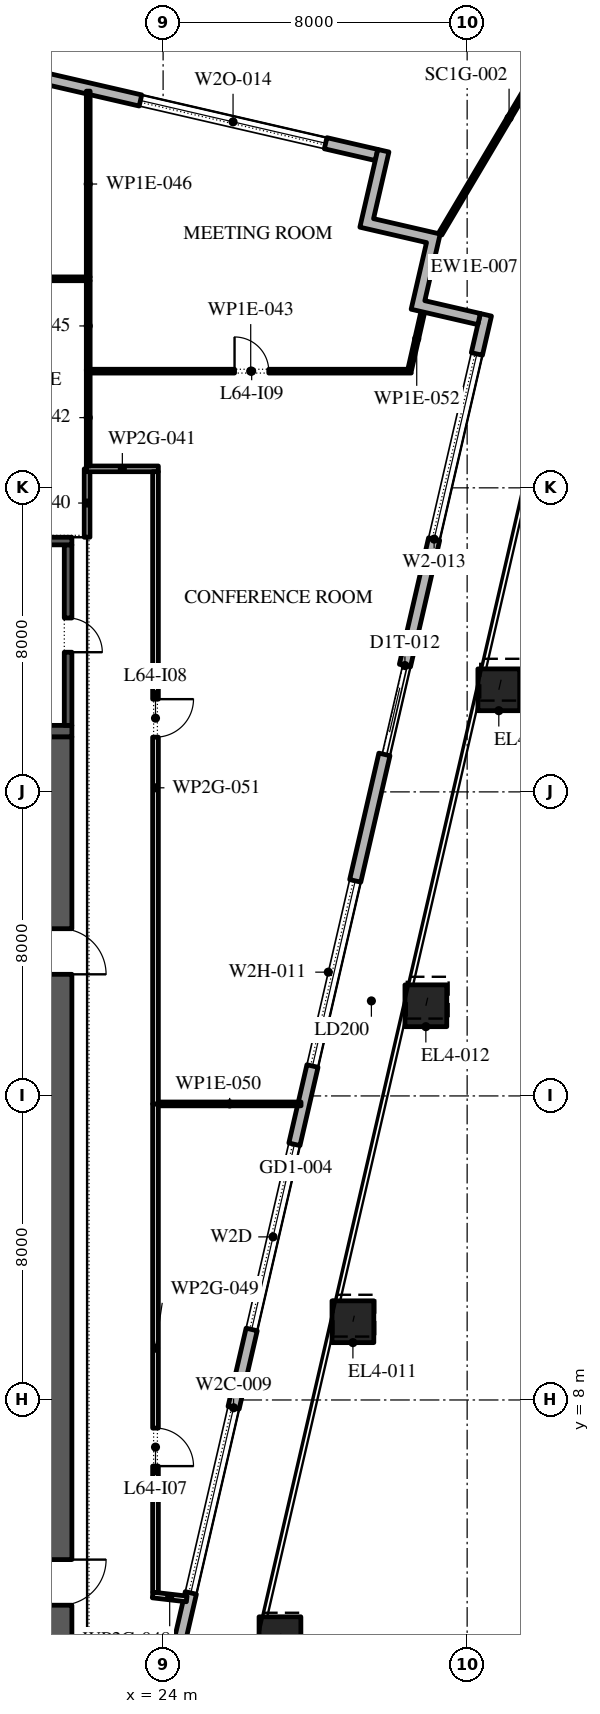
"""IFC4 building model, lengths in metres.
Left out: names, types, materials, properties, quantities, classifications, styles, units other than length and angle.
Written with IfcOpenShell. Run it as: python <this file> out.ifc"""

import sys

from ifc_helpers import new_model, si_unit, direction, frame, frame_2d, origin, origin_2d, place, context, subcontext, project, spatial, polyline, rectangle, outline, extrude, element, fill, save


model = new_model("IFC4")
c1 = context("Model", 3, precision=1e-05, world=origin(), true_north=direction((0.0, 1.0)))
c2 = subcontext(c1, "Body", "Model", "MODEL_VIEW")
j1 = project(units=[si_unit("LENGTHUNIT", "METRE"), si_unit("PLANEANGLEUNIT", "RADIAN")], contexts=[c1])
p1 = place(None, origin())
s1 = spatial("IfcSite", under=j1, at=p1, CompositionType="ELEMENT")
p2 = place(p1, origin())
s2 = spatial("IfcBuilding", under=s1, at=p2, CompositionType="ELEMENT")
p3 = place(p2, frame((0.0, 0.0, 293.4)))
s3 = spatial("IfcBuildingStorey", under=s2, at=p3, CompositionType="ELEMENT", Elevation=293.4)
p4 = place(p3, frame((27.075, 1.745, 0.0), z_axis=(0.005810646452, 0.025276312067, 0.999663615641), x_axis=(-0.974579651079, 0.224041299099, 0.0)))
e1 = element("IfcColumn", 1, at=p4, inside=s3, PredefinedType="COLUMN", context=c2, shape_type="SweptSolid", body=[
    extrude(rectangle(XDim=1.1, YDim=1.1, at=origin_2d()), origin(), (0.0, 0.0, 1.0), 4.202),
])
p5 = place(p3, frame((28.994, 10.059, 0.0), z_axis=(0.008712298116, 0.0379275378, 0.999242511975), x_axis=(-0.974617095667, 0.223878352757, 0.0)))
e2 = element("IfcColumn", 2, at=p5, inside=s3, PredefinedType="COLUMN", context=c2, shape_type="SweptSolid", body=[
    extrude(rectangle(XDim=1.1, YDim=1.1, at=origin_2d()), origin(), (0.0, 0.0, 1.0), 4.203),
])
p6 = place(p3, frame((30.914, 18.373, 0.0), z_axis=(0.011667590749, 0.050559559912, 0.998652891764), x_axis=(-0.974391195695, 0.224859506699, 0.0)))
e3 = element("IfcColumn", 3, at=p6, inside=s3, PredefinedType="COLUMN", context=c2, shape_type="SweptSolid", body=[
    extrude(rectangle(XDim=1.1, YDim=1.1, at=origin_2d()), origin(), (0.0, 0.0, 1.0), 4.206),
])
p7 = place(p3, frame((32.833, 26.686, 0.0), z_axis=(0.014558945825, 0.063166103598, 0.997896828561), x_axis=(-0.97445148511, 0.224598092528, 0.0)))
e4 = element("IfcColumn", 4, at=p7, inside=s3, PredefinedType="COLUMN", context=c2, shape_type="SweptSolid", body=[
    extrude(rectangle(XDim=1.1, YDim=1.1, at=origin_2d()), origin(), (0.0, 0.0, 1.0), 4.209),
])
p8 = place(p3, frame((21.359, -11.678, 0.0), z_axis=(0.0, 0.0, 1.0), x_axis=(0.224949198343, 0.974370493275, 0.0)))
e5 = element("IfcWall", 5, at=p8, inside=s3, PredefinedType="STANDARD", context=c2, shape_type="SweptSolid", body=[
    extrude(rectangle(XDim=49.5, YDim=0.3, at=frame_2d((24.75, 0.0))), origin(), (0.0, 0.0, 1.0), 3.75),
])
p9 = place(p8, frame((0.907, 0.0, 0.45)))
e6 = element("IfcOpeningElement", 6, at=p9, cuts=e5, PredefinedType="OPENING", context=c2, shape_type="SweptSolid", body=[
    extrude(rectangle(XDim=5.0, YDim=3.25, at=frame_2d((2.5, 1.625))), frame((0.0, 0.16, 0.0), z_axis=(0.0, -1.0, 0.0), x_axis=(1.0, 0.0, 0.0)), (0.0, 0.0, 1.0), 0.32),
])
p10 = place(p8, frame((7.871, 0.0, 0.45)))
e7 = element("IfcOpeningElement", 7, at=p10, cuts=e5, PredefinedType="OPENING", context=c2, shape_type="SweptSolid", body=[
    extrude(rectangle(XDim=5.0, YDim=2.85, at=frame_2d((2.5, 1.425))), frame((0.0, 0.16, 0.0), z_axis=(0.0, -1.0, 0.0), x_axis=(1.0, 0.0, 0.0)), (0.0, 0.0, 1.0), 0.32),
])
p11 = place(p8, frame((14.986, 0.0, 0.45)))
e8 = element("IfcOpeningElement", 8, at=p11, cuts=e5, PredefinedType="OPENING", context=c2, shape_type="SweptSolid", body=[
    extrude(rectangle(XDim=5.0, YDim=2.85, at=frame_2d((2.5, 1.425))), frame((0.0, 0.16, 0.0), z_axis=(0.0, -1.0, 0.0), x_axis=(1.0, 0.0, 0.0)), (0.0, 0.0, 1.0), 0.32),
])
p12 = place(p8, frame((22.1, 0.0, 0.45)))
e9 = element("IfcOpeningElement", 9, at=p12, cuts=e5, PredefinedType="OPENING", context=c2, shape_type="SweptSolid", body=[
    extrude(rectangle(XDim=5.0, YDim=2.8, at=frame_2d((2.5, 1.4))), frame((0.0, 0.16, 0.0), z_axis=(0.0, -1.0, 0.0), x_axis=(1.0, 0.0, 0.0)), (0.0, 0.0, 1.0), 0.32),
])
p13 = place(p8, frame((29.214, 0.0, 0.45)))
e10 = element("IfcOpeningElement", 10, at=p13, cuts=e5, PredefinedType="OPENING", context=c2, shape_type="SweptSolid", body=[
    extrude(rectangle(XDim=5.0, YDim=2.7, at=frame_2d((2.5, 1.35))), frame((0.0, 0.16, 0.0), z_axis=(0.0, -1.0, 0.0), x_axis=(1.0, 0.0, 0.0)), (0.0, 0.0, 1.0), 0.32),
])
p14 = place(p8, frame((37.628, 0.0, 0.0)))
e11 = element("IfcOpeningElement", 11, at=p14, cuts=e5, PredefinedType="OPENING", context=c2, shape_type="SweptSolid", body=[
    extrude(rectangle(XDim=2.4, YDim=2.65, at=frame_2d((1.2, 1.325))), frame((0.0, 0.16, 0.0), z_axis=(0.0, -1.0, 0.0), x_axis=(1.0, 0.0, 0.0)), (0.0, 0.0, 1.0), 0.32),
])
p15 = place(p8, frame((43.443, 0.0, 0.45)))
e12 = element("IfcOpeningElement", 12, at=p15, cuts=e5, PredefinedType="OPENING", context=c2, shape_type="SweptSolid", body=[
    extrude(rectangle(XDim=5.0, YDim=3.25, at=frame_2d((2.5, 1.625))), frame((0.0, 0.16, 0.0), z_axis=(0.0, -1.0, 0.0), x_axis=(1.0, 0.0, 0.0)), (0.0, 0.0, 1.0), 0.32),
])
p16 = place(p3, frame((29.616, 40.758, 0.0), z_axis=(0.0, 0.0, 1.0), x_axis=(-0.974370532314, 0.224949029246, 0.0)))
e13 = element("IfcWall", 13, at=p16, inside=s3, PredefinedType="STANDARD", context=c2, shape_type="SweptSolid", body=[
    extrude(rectangle(XDim=48.0, YDim=0.3, at=frame_2d((24.0, 0.0))), origin(), (0.0, 0.0, 1.0), 3.75),
])
p17 = place(p16, frame((1.375, 0.0, 0.45)))
e14 = element("IfcOpeningElement", 14, at=p17, cuts=e13, PredefinedType="OPENING", context=c2, shape_type="SweptSolid", body=[
    extrude(rectangle(XDim=5.0, YDim=2.2, at=frame_2d((2.5, 1.1))), frame((0.0, 0.16, 0.0), z_axis=(0.0, -1.0, 0.0), x_axis=(1.0, 0.0, 0.0)), (0.0, 0.0, 1.0), 0.32),
])
p18 = place(p16, frame((10.575, 0.0, 0.0)))
e15 = element("IfcOpeningElement", 15, at=p18, cuts=e13, PredefinedType="OPENING", context=c2, shape_type="SweptSolid", body=[
    extrude(rectangle(XDim=2.4, YDim=2.65, at=frame_2d((1.2, 1.325))), frame((0.0, 0.16, 0.0), z_axis=(0.0, -1.0, 0.0), x_axis=(1.0, 0.0, 0.0)), (0.0, 0.0, 1.0), 0.32),
])
p19 = place(p16, frame((17.325, 0.0, 0.45)))
e16 = element("IfcOpeningElement", 16, at=p19, cuts=e13, PredefinedType="OPENING", context=c2, shape_type="SweptSolid", body=[
    extrude(rectangle(XDim=5.0, YDim=2.2, at=frame_2d((2.5, 1.1))), frame((0.0, 0.16, 0.0), z_axis=(0.0, -1.0, 0.0), x_axis=(1.0, 0.0, 0.0)), (0.0, 0.0, 1.0), 0.32),
])
p20 = place(p16, frame((25.375, 0.0, 0.45)))
e17 = element("IfcOpeningElement", 17, at=p20, cuts=e13, PredefinedType="OPENING", context=c2, shape_type="SweptSolid", body=[
    extrude(rectangle(XDim=5.0, YDim=2.2, at=frame_2d((2.5, 1.1))), frame((0.0, 0.16, 0.0), z_axis=(0.0, -1.0, 0.0), x_axis=(1.0, 0.0, 0.0)), (0.0, 0.0, 1.0), 0.32),
])
p21 = place(p16, frame((33.425, 0.0, 0.45)))
e18 = element("IfcOpeningElement", 18, at=p21, cuts=e13, PredefinedType="OPENING", context=c2, shape_type="SweptSolid", body=[
    extrude(rectangle(XDim=5.0, YDim=2.2, at=frame_2d((2.5, 1.1))), frame((0.0, 0.16, 0.0), z_axis=(0.0, -1.0, 0.0), x_axis=(1.0, 0.0, 0.0)), (0.0, 0.0, 1.0), 0.32),
])
p22 = place(p16, frame((42.175, 0.0, 0.0)))
e19 = element("IfcOpeningElement", 19, at=p22, cuts=e13, PredefinedType="OPENING", context=c2, shape_type="SweptSolid", body=[
    extrude(rectangle(XDim=2.4, YDim=3.5, at=frame_2d((1.2, 1.75))), frame((0.0, 0.16, 0.0), z_axis=(0.0, -1.0, 0.0), x_axis=(1.0, 0.0, 0.0)), (0.0, 0.0, 1.0), 0.32),
])
p23 = place(p3, origin())
e20 = element("IfcWall", 20, at=p23, inside=s3, PredefinedType="STANDARD", context=c2, shape_type="SweptSolid", body=[
    extrude(outline(polyline([(30.931, 38.453), (29.177, 38.858), (29.65, 40.905), (29.942, 40.837), (29.537, 39.083), (31.291, 38.678), (30.886, 36.924), (32.348, 36.587), (32.28, 36.295), (30.526, 36.699), (30.931, 38.453)])), origin(), (0.0, 0.0, 1.0), 3.75),
])
p24 = place(p3, frame((31.291, 38.678, -0.05), z_axis=(0.0, 0.0, 1.0), x_axis=(0.510319551581, 0.859984857584, 0.0)))
e21 = element("IfcWall", 21, at=p24, inside=s3, PredefinedType="STANDARD", context=c2, shape_type="SweptSolid", body=[
    extrude(rectangle(XDim=7.103, YDim=0.1, at=frame_2d((3.552, 0.0))), origin(), (0.0, 0.0, 1.0), 3.8),
])
p25 = place(p3, frame((21.3, -2.45, 0.0), z_axis=(0.0, 0.0, 1.0), x_axis=(0.0, 1.0, 0.0)))
e22 = element("IfcWall", 22, at=p25, inside=s3, PredefinedType="SHEAR", context=c2, shape_type="SweptSolid", body=[
    extrude(rectangle(XDim=27.9, YDim=0.6, at=frame_2d((13.95, 0.0))), origin(), (0.0, 0.0, 1.0), 3.75),
])
p26 = place(p25, frame((5.05, 0.0, 0.0)))
e23 = element("IfcOpeningElement", 23, at=p26, cuts=e22, PredefinedType="OPENING", context=c2, shape_type="SweptSolid", body=[
    extrude(rectangle(XDim=1.2, YDim=2.1, at=frame_2d((0.6, 1.05))), frame((0.0, 0.31, 0.0), z_axis=(0.0, -1.0, 0.0), x_axis=(1.0, 0.0, 0.0)), (0.0, 0.0, 1.0), 0.62),
])
p27 = place(p25, frame((21.65, 0.0, 0.0)))
e24 = element("IfcOpeningElement", 24, at=p27, cuts=e22, PredefinedType="OPENING", context=c2, shape_type="SweptSolid", body=[
    extrude(rectangle(XDim=1.2, YDim=2.1, at=frame_2d((0.6, 1.05))), frame((0.0, 0.31, 0.0), z_axis=(0.0, -1.0, 0.0), x_axis=(1.0, 0.0, 0.0)), (0.0, 0.0, 1.0), 0.62),
])
p28 = place(p3, frame((10.4, 25.6, 0.0), z_axis=(0.0, 0.0, 1.0), x_axis=(1.0, 0.0, 0.0)))
e25 = element("IfcWall", 25, at=p28, inside=s3, PredefinedType="SHEAR", context=c2, shape_type="SweptSolid", body=[
    extrude(rectangle(XDim=11.2, YDim=0.3, at=frame_2d((5.6, 0.0))), origin(), (0.0, 0.0, 1.0), 3.75),
])
p29 = place(p3, frame((21.5, 25.75, 0.0), z_axis=(0.0, 0.0, 1.0), x_axis=(0.0, 1.0, 0.0)))
e26 = element("IfcWall", 26, at=p29, inside=s3, PredefinedType="SHEAR", context=c2, shape_type="SweptSolid", body=[
    extrude(rectangle(XDim=4.75, YDim=0.2, at=frame_2d((2.375, 0.0))), origin(), (0.0, 0.0, 1.0), 3.75),
])
p30 = place(p29, frame((1.925, 0.0, 0.0)))
e27 = element("IfcOpeningElement", 27, at=p30, cuts=e26, PredefinedType="OPENING", context=c2, shape_type="SweptSolid", body=[
    extrude(rectangle(XDim=0.9, YDim=2.1, at=frame_2d((0.45, 1.05))), frame((0.0, 0.11, 0.0), z_axis=(0.0, -1.0, 0.0), x_axis=(1.0, 0.0, 0.0)), (0.0, 0.0, 1.0), 0.22),
])
p31 = place(p3, frame((10.4, 30.6, 0.0), z_axis=(0.0, 0.0, 1.0), x_axis=(1.0, 0.0, 0.0)))
e28 = element("IfcWall", 28, at=p31, inside=s3, PredefinedType="SHEAR", context=c2, shape_type="SweptSolid", body=[
    extrude(rectangle(XDim=11.2, YDim=0.2, at=frame_2d((5.6, 0.0))), origin(), (0.0, 0.0, 1.0), 3.75),
])
p32 = place(p3, frame((22.0, 30.7, 0.0), z_axis=(0.0, 0.0, 1.0), x_axis=(0.0, 1.0, 0.0)))
e29 = element("IfcWall", 29, at=p32, inside=s3, PredefinedType="PARTITIONING", context=c2, shape_type="SweptSolid", body=[
    extrude(rectangle(XDim=1.8, YDim=0.15, at=frame_2d((0.9, 0.0))), origin(), (0.0, 0.0, 1.0), 3.75),
])
p33 = place(p3, frame((21.98, 32.5, 0.0), z_axis=(0.0, 0.0, 1.0), x_axis=(1.0, 0.0, 0.0)))
e30 = element("IfcWall", 30, at=p33, inside=s3, PredefinedType="PARTITIONING", context=c2, shape_type="SweptSolid", body=[
    extrude(rectangle(XDim=1.895, YDim=0.15, at=frame_2d((0.948, 0.0))), origin(), (0.0, 0.0, 1.0), 3.75),
])
p34 = place(p3, frame((22.03, 35.12, 0.0), z_axis=(0.0, 0.0, 1.0), x_axis=(0.0, -1.0, 0.0)))
e31 = element("IfcWall", 31, at=p34, inside=s3, PredefinedType="PARTITIONING", context=c2, shape_type="SweptSolid", body=[
    extrude(rectangle(XDim=2.545, YDim=0.1, at=frame_2d((1.272, 0.0))), origin(), (0.0, 0.0, 1.0), 3.75),
])
p35 = place(p3, frame((22.08, 35.07, 0.0), z_axis=(0.0, 0.0, 1.0), x_axis=(1.0, 0.0, 0.0)))
e32 = element("IfcWall", 32, at=p35, inside=s3, PredefinedType="PARTITIONING", context=c2, shape_type="SweptSolid", body=[
    extrude(rectangle(XDim=8.45, YDim=0.1, at=frame_2d((4.225, 0.0))), origin(), (0.0, 0.0, 1.0), 3.75),
])
p36 = place(p35, frame((3.8, 0.0, 0.0)))
e33 = element("IfcOpeningElement", 33, at=p36, cuts=e32, PredefinedType="OPENING", context=c2, shape_type="SweptSolid", body=[
    extrude(rectangle(XDim=0.9, YDim=2.1, at=frame_2d((0.45, 1.05))), frame((0.0, 0.06, 0.0), z_axis=(0.0, -1.0, 0.0), x_axis=(1.0, 0.0, 0.0)), (0.0, 0.0, 1.0), 0.12),
])
p37 = place(p3, frame((22.08, 37.5, 0.0), z_axis=(0.0, 0.0, 1.0), x_axis=(-1.0, 0.0, 0.0)))
e34 = element("IfcWall", 34, at=p37, inside=s3, PredefinedType="PARTITIONING", context=c2, shape_type="SweptSolid", body=[
    extrude(rectangle(XDim=12.69, YDim=0.1, at=frame_2d((6.345, 0.0))), origin(), (0.0, 0.0, 1.0), 3.75),
])
p38 = place(p3, frame((22.03, 37.45, 0.0), z_axis=(0.0, 0.0, 1.0), x_axis=(0.0, -1.0, 0.0)))
e35 = element("IfcWall", 35, at=p38, inside=s3, PredefinedType="PARTITIONING", context=c2, shape_type="SweptSolid", body=[
    extrude(rectangle(XDim=2.38, YDim=0.1, at=frame_2d((1.19, 0.0))), origin(), (0.0, 0.0, 1.0), 3.75),
])
p39 = place(p3, frame((22.03, 42.438, 0.0), z_axis=(0.0, 0.0, 1.0), x_axis=(0.0, -1.0, 0.0)))
e36 = element("IfcWall", 36, at=p39, inside=s3, PredefinedType="PARTITIONING", context=c2, shape_type="SweptSolid", body=[
    extrude(rectangle(XDim=4.888, YDim=0.1, at=frame_2d((2.444, 0.0))), origin(), (0.0, 0.0, 1.0), 3.75),
])
p40 = place(p3, frame((23.725, 2.869, 0.0), z_axis=(0.0, 0.0, 1.0), x_axis=(0.993330469257, -0.115302119865, 0.0)))
e37 = element("IfcWall", 37, at=p40, inside=s3, PredefinedType="PARTITIONING", context=c2, shape_type="SweptSolid", body=[
    extrude(rectangle(XDim=0.902, YDim=0.15, at=frame_2d((0.451, 0.0))), origin(), (0.0, 0.0, 1.0), 3.75),
])
p41 = place(p3, frame((23.8, 15.79, 0.0), z_axis=(0.0, 0.0, 1.0), x_axis=(0.0, -1.0, 0.0)))
e38 = element("IfcWall", 38, at=p41, inside=s3, PredefinedType="PARTITIONING", context=c2, shape_type="SweptSolid", body=[
    extrude(rectangle(XDim=12.855, YDim=0.15, at=frame_2d((6.427, 0.0))), origin(), (0.0, 0.0, 1.0), 3.75),
])
p42 = place(p41, frame((8.53, 0.0, 0.0)))
e39 = element("IfcOpeningElement", 39, at=p42, cuts=e38, PredefinedType="OPENING", context=c2, shape_type="SweptSolid", body=[
    extrude(rectangle(XDim=1.0, YDim=2.1, at=frame_2d((0.5, 1.05))), frame((0.0, 0.085, 0.0), z_axis=(0.0, -1.0, 0.0), x_axis=(1.0, 0.0, 0.0)), (0.0, 0.0, 1.0), 0.17),
])
p43 = place(p3, frame((23.875, 15.79, 0.0), z_axis=(0.0, 0.0, 1.0), x_axis=(1.0, 0.0, 0.0)))
e40 = element("IfcWall", 40, at=p43, inside=s3, PredefinedType="PARTITIONING", context=c2, shape_type="SweptSolid", body=[
    extrude(rectangle(XDim=3.754, YDim=0.1, at=frame_2d((1.877, 0.0))), origin(), (0.0, 0.0, 1.0), 3.75),
])
p44 = place(p3, frame((23.8, 32.425, 0.0), z_axis=(0.0, 0.0, 1.0), x_axis=(0.0, -1.0, 0.0)))
e41 = element("IfcWall", 41, at=p44, inside=s3, PredefinedType="PARTITIONING", context=c2, shape_type="SweptSolid", body=[
    extrude(rectangle(XDim=16.635, YDim=0.15, at=frame_2d((8.317, 0.0))), origin(), (0.0, 0.0, 1.0), 3.75),
])
p45 = place(p44, frame((5.985, 0.0, 0.0)))
e42 = element("IfcOpeningElement", 42, at=p45, cuts=e41, PredefinedType="OPENING", context=c2, shape_type="SweptSolid", body=[
    extrude(rectangle(XDim=1.0, YDim=2.1, at=frame_2d((0.5, 1.05))), frame((0.0, 0.085, 0.0), z_axis=(0.0, -1.0, 0.0), x_axis=(1.0, 0.0, 0.0)), (0.0, 0.0, 1.0), 0.17),
])
p46 = place(p3, frame((30.491, 35.119, 0.0), z_axis=(0.0, 0.0, 1.0), x_axis=(0.221461033886, 0.975169221453, 0.0)))
e43 = element("IfcWall", 43, at=p46, inside=s3, PredefinedType="PARTITIONING", context=c2, shape_type="SweptSolid", body=[
    extrude(rectangle(XDim=1.648, YDim=0.1, at=frame_2d((0.824, 0.0))), origin(), (0.0, 0.0, 1.0), 3.75),
])
p47 = place(p11, origin())
e44 = element("IfcWindow", 44, at=p47, inside=s3, PartitioningType="DOUBLE_PANEL_VERTICAL", PredefinedType="WINDOW", context=c2, shape_type="SweptSolid", body=[
    extrude(rectangle(XDim=5.0, YDim=2.85, at=frame_2d((2.5, 1.425))), frame((0.0, 0.03, 0.0), z_axis=(0.0, -1.0, 0.0), x_axis=(1.0, 0.0, 0.0)), (0.0, 0.0, 1.0), 0.06),
])
fill(e8, e44)
p48 = place(p12, origin())
e45 = element("IfcWindow", 45, at=p48, inside=s3, PartitioningType="DOUBLE_PANEL_VERTICAL", PredefinedType="WINDOW", context=c2, shape_type="SweptSolid", body=[
    extrude(rectangle(XDim=5.0, YDim=2.8, at=frame_2d((2.5, 1.4))), frame((0.0, 0.03, 0.0), z_axis=(0.0, -1.0, 0.0), x_axis=(1.0, 0.0, 0.0)), (0.0, 0.0, 1.0), 0.06),
])
fill(e9, e45)
p49 = place(p13, origin())
e46 = element("IfcWindow", 46, at=p49, inside=s3, PartitioningType="DOUBLE_PANEL_VERTICAL", PredefinedType="WINDOW", context=c2, shape_type="SweptSolid", body=[
    extrude(rectangle(XDim=5.0, YDim=2.7, at=frame_2d((2.5, 1.35))), frame((0.0, 0.03, 0.0), z_axis=(0.0, -1.0, 0.0), x_axis=(1.0, 0.0, 0.0)), (0.0, 0.0, 1.0), 0.06),
])
fill(e10, e46)
p50 = place(p14, origin())
e47 = element("IfcDoor", 47, at=p50, inside=s3, OperationType="DOUBLE_DOOR_SLIDING", PredefinedType="DOOR", context=c2, shape_type="SweptSolid", body=[
    extrude(rectangle(XDim=2.4, YDim=2.65, at=frame_2d((1.2, 1.325))), frame((0.0, 0.025, 0.0), z_axis=(0.0, -1.0, 0.0), x_axis=(1.0, 0.0, 0.0)), (0.0, 0.0, 1.0), 0.05),
])
fill(e11, e47)
p51 = place(p15, origin())
e48 = element("IfcWindow", 48, at=p51, inside=s3, PartitioningType="DOUBLE_PANEL_VERTICAL", PredefinedType="WINDOW", context=c2, shape_type="SweptSolid", body=[
    extrude(rectangle(XDim=5.0, YDim=3.25, at=frame_2d((2.5, 1.625))), frame((0.0, 0.03, 0.0), z_axis=(0.0, -1.0, 0.0), x_axis=(1.0, 0.0, 0.0)), (0.0, 0.0, 1.0), 0.06),
])
fill(e12, e48)
p52 = place(p17, origin())
e49 = element("IfcWindow", 49, at=p52, inside=s3, PartitioningType="DOUBLE_PANEL_VERTICAL", PredefinedType="WINDOW", context=c2, shape_type="SweptSolid", body=[
    extrude(rectangle(XDim=5.0, YDim=2.2, at=frame_2d((2.5, 1.1))), frame((0.0, 0.03, 0.0), z_axis=(0.0, -1.0, 0.0), x_axis=(1.0, 0.0, 0.0)), (0.0, 0.0, 1.0), 0.06),
])
fill(e14, e49)
p53 = place(p26, frame((1.2, 0.0, 0.0), z_axis=(0.0, 0.0, 1.0), x_axis=(-1.0, 0.0, 0.0)))
e50 = element("IfcDoor", 50, at=p53, inside=s3, OperationType="SINGLE_SWING_RIGHT", PredefinedType="DOOR", context=c2, shape_type="SweptSolid", body=[
    extrude(rectangle(XDim=1.2, YDim=2.1, at=frame_2d((0.6, 1.05))), frame((0.0, 0.025, 0.0), z_axis=(0.0, -1.0, 0.0), x_axis=(1.0, 0.0, 0.0)), (0.0, 0.0, 1.0), 0.05),
])
fill(e23, e50)
p54 = place(p27, frame((1.2, 0.0, 0.0), z_axis=(0.0, 0.0, 1.0), x_axis=(-1.0, 0.0, 0.0)))
e51 = element("IfcDoor", 51, at=p54, inside=s3, OperationType="SINGLE_SWING_LEFT", PredefinedType="DOOR", context=c2, shape_type="SweptSolid", body=[
    extrude(rectangle(XDim=1.2, YDim=2.1, at=frame_2d((0.6, 1.05))), frame((0.0, 0.025, 0.0), z_axis=(0.0, -1.0, 0.0), x_axis=(1.0, 0.0, 0.0)), (0.0, 0.0, 1.0), 0.05),
])
fill(e24, e51)
p55 = place(p30, frame((0.9, 0.15, 0.0), z_axis=(0.0, 0.0, 1.0), x_axis=(-1.0, 0.0, 0.0)))
e52 = element("IfcDoor", 52, at=p55, inside=s3, OperationType="SINGLE_SWING_LEFT", PredefinedType="DOOR", context=c2, shape_type="SweptSolid", body=[
    extrude(rectangle(XDim=0.9, YDim=2.1, at=frame_2d((0.45, 1.05))), frame((0.0, 0.1, 0.0), z_axis=(0.0, -1.0, 0.0), x_axis=(1.0, 0.0, 0.0)), (0.0, 0.0, 1.0), 0.05),
])
fill(e27, e52)
p56 = place(p42, origin())
e53 = element("IfcDoor", 53, at=p56, inside=s3, OperationType="SINGLE_SWING_LEFT", PredefinedType="DOOR", context=c2, shape_type="SweptSolid", body=[
    extrude(rectangle(XDim=1.0, YDim=2.1, at=frame_2d((0.5, 1.05))), frame((0.0, 0.025, 0.0), z_axis=(0.0, -1.0, 0.0), x_axis=(1.0, 0.0, 0.0)), (0.0, 0.0, 1.0), 0.05),
])
fill(e39, e53)
p57 = place(p45, origin())
e54 = element("IfcDoor", 54, at=p57, inside=s3, OperationType="SINGLE_SWING_RIGHT", PredefinedType="DOOR", context=c2, shape_type="SweptSolid", body=[
    extrude(rectangle(XDim=1.0, YDim=2.1, at=frame_2d((0.5, 1.05))), frame((0.0, 0.025, 0.0), z_axis=(0.0, -1.0, 0.0), x_axis=(1.0, 0.0, 0.0)), (0.0, 0.0, 1.0), 0.05),
])
fill(e42, e54)
p58 = place(p36, origin())
e55 = element("IfcDoor", 55, at=p58, inside=s3, OperationType="SINGLE_SWING_RIGHT", PredefinedType="DOOR", context=c2, shape_type="SweptSolid", body=[
    extrude(rectangle(XDim=0.9, YDim=2.1, at=frame_2d((0.45, 1.05))), frame((0.0, 0.025, 0.0), z_axis=(0.0, -1.0, 0.0), x_axis=(1.0, 0.0, 0.0)), (0.0, 0.0, 1.0), 0.05),
])
fill(e33, e55)
save(model, sys.argv[1])
